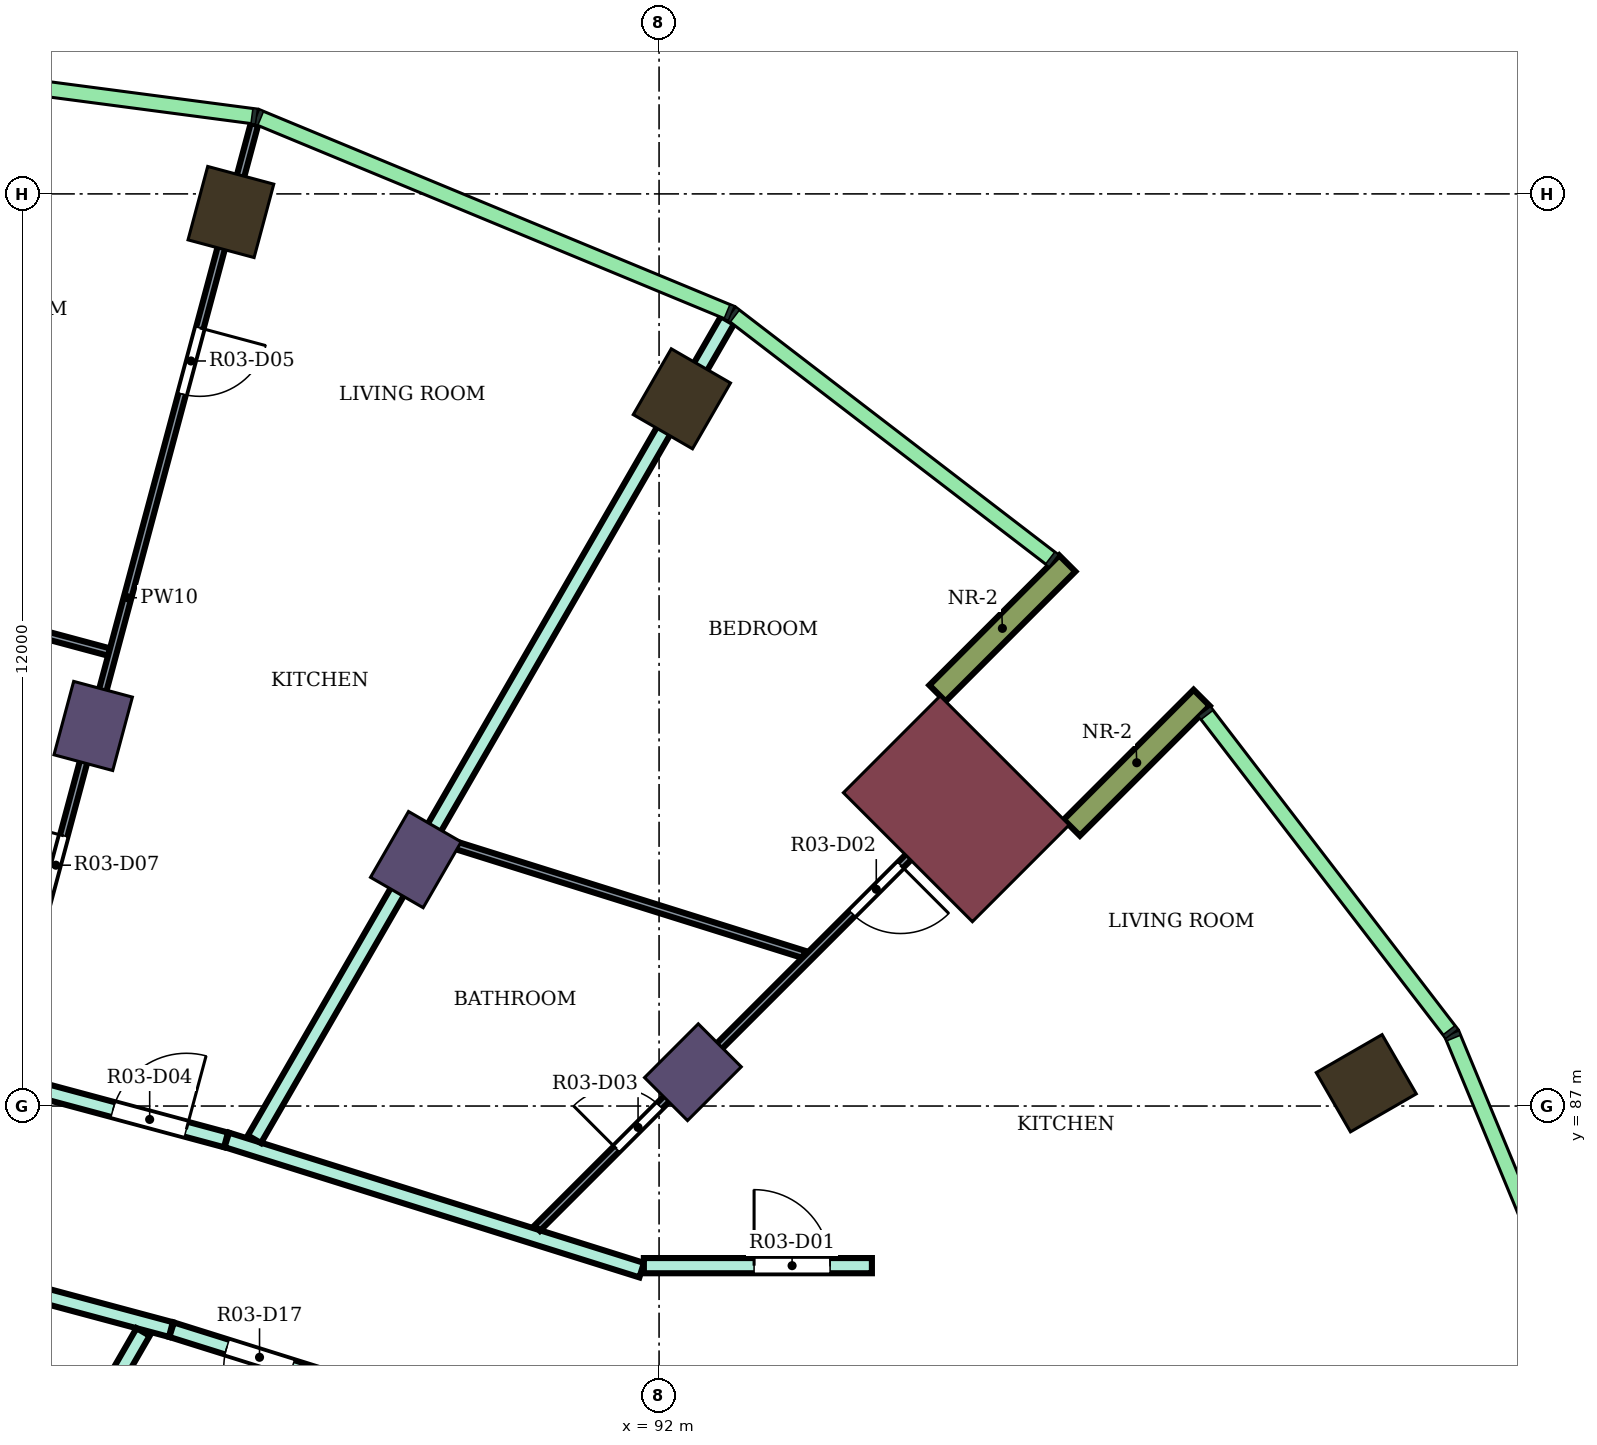
"""IFC4 building model, lengths in metres.
Left out: names, types, materials, properties, quantities, classifications, styles, units other than length and angle.
Written with IfcOpenShell. Run it as: python <this file> out.ifc"""

import sys

from ifc_helpers import new_model, si_unit, direction, frame, frame_2d, origin, origin_2d, place, context, subcontext, project, spatial, rectangle, extrude, element, fill, save


model = new_model("IFC4")
c1 = context("Model", 3, precision=1e-05, world=origin(), true_north=direction((0.0, 1.0)))
c2 = subcontext(c1, "Body", "Model", "MODEL_VIEW")
j1 = project(units=[si_unit("LENGTHUNIT", "METRE"), si_unit("PLANEANGLEUNIT", "RADIAN")], contexts=[c1])
p1 = place(None, origin())
s1 = spatial("IfcSite", under=j1, at=p1, CompositionType="ELEMENT")
p2 = place(p1, origin())
s2 = spatial("IfcBuilding", under=s1, at=p2, CompositionType="ELEMENT")
p3 = place(p2, frame((0.0, 0.0, 186.4)))
s3 = spatial("IfcBuildingStorey", under=s2, at=p3, CompositionType="ELEMENT", Elevation=186.4)
for number, where, z_axis, x_axis in (
    (1, (101.304, 87.3, 0.0), (0.0, 0.0, 1.0), (0.866, 0.5, 0.0)),
    (2, (92.3, 96.304, 0.0), (0.0, 0.0, 1.0), (0.5, 0.866, 0.0)),
    (3, (86.367, 98.762, 0.0), (0.0, 0.0, 1.0), (0.259, 0.966, 0.0)),
):
    element("IfcColumn", number, at=place(p3, frame(where, z_axis=z_axis, x_axis=x_axis)), inside=s3, PredefinedType="COLUMN", context=c2, shape_type="SweptSolid", body=[
        extrude(rectangle(XDim=1.0, YDim=0.9, at=origin_2d()), origin(), (0.0, 0.0, 1.0), 4.1),
    ])
for number, where, z_axis, x_axis in (
    (4, (92.445, 87.445, 0.0), (0.0, 0.0, 1.0), (0.707, 0.707, 0.0)),
    (5, (88.8, 90.242, 0.0), (0.0, 0.0, 1.0), (0.5, 0.866, 0.0)),
    (6, (84.555, 92.0, 0.0), (0.0, 0.0, 1.0), (0.259, 0.966, 0.0)),
):
    element("IfcColumn", number, at=place(p3, frame(where, z_axis=z_axis, x_axis=x_axis)), inside=s3, PredefinedType="COLUMN", context=c2, shape_type="SweptSolid", body=[
        extrude(rectangle(XDim=1.0, YDim=0.8, at=origin_2d()), origin(), (0.0, 0.0, 1.0), 4.1),
    ])
p4 = place(p3, frame((95.91, 90.91, 0.0), z_axis=(0.0, 0.0, 1.0), x_axis=(0.707106781187, 0.707106781187, 0.0)))
e7 = element("IfcColumn", 7, at=p4, inside=s3, PredefinedType="COLUMN", context=c2, shape_type="SweptSolid", body=[
    extrude(rectangle(XDim=1.8, YDim=2.4, at=origin_2d()), origin(), (0.0, 0.0, 1.0), 4.1),
])
for number, where, z_axis, x_axis in (
    (8, (97.43, 90.662, 0.0), (0.0, 0.0, 1.0), (0.707, 0.707, 0.0)),
    (9, (95.662, 92.43, 0.0), (0.0, 0.0, 1.0), (0.707, 0.707, 0.0)),
):
    element("IfcWall", number, at=place(p3, frame(where, z_axis=z_axis, x_axis=x_axis)), inside=s3, PredefinedType="NOTDEFINED", context=c2, shape_type="SweptSolid", body=[
        extrude(rectangle(XDim=2.416, YDim=0.3, at=frame_2d((1.208, 0.0))), origin(), (0.0, 0.0, 1.0), 4.1),
    ])
p5 = place(p3, frame((80.0, 85.554, 0.0), z_axis=(0.0, 0.0, 1.0), x_axis=(0.965928989968, -0.258807237802, 0.0)))
e10 = element("IfcWall", 10, at=p5, inside=s3, PredefinedType="PARTITIONING", context=c2, shape_type="SweptSolid", body=[
    extrude(rectangle(XDim=5.774, YDim=0.2, at=frame_2d((2.887, 0.0))), origin(), (0.0, 0.0, 1.0), 3.65),
])
p6 = place(p5, frame((2.292, 0.0, 0.0)))
e11 = element("IfcOpeningElement", 11, at=p6, cuts=e10, PredefinedType="OPENING", context=c2, shape_type="SweptSolid", body=[
    extrude(rectangle(XDim=0.9, YDim=2.1, at=frame_2d((0.45, 1.05))), frame((0.0, 0.11, 0.0), z_axis=(0.0, -1.0, 0.0), x_axis=(1.0, 0.0, 0.0)), (0.0, 0.0, 1.0), 0.22),
])
p7 = place(p3, frame((80.048, 88.233, 0.0), z_axis=(0.0, 0.0, 1.0), x_axis=(0.965787353661, -0.259335280109, 0.0)))
e12 = element("IfcWall", 12, at=p7, inside=s3, PredefinedType="PARTITIONING", context=c2, shape_type="SweptSolid", body=[
    extrude(rectangle(XDim=6.476, YDim=0.2, at=frame_2d((3.238, 0.0))), origin(), (0.0, 0.0, 1.0), 3.65),
])
p8 = place(p7, frame((4.936, 0.0, 0.0)))
e13 = element("IfcOpeningElement", 13, at=p8, cuts=e12, PredefinedType="OPENING", context=c2, shape_type="SweptSolid", body=[
    extrude(rectangle(XDim=1.0, YDim=2.1, at=frame_2d((0.5, 1.05))), frame((0.0, 0.11, 0.0), z_axis=(0.0, -1.0, 0.0), x_axis=(1.0, 0.0, 0.0)), (0.0, 0.0, 1.0), 0.22),
])
p9 = place(p3, frame((83.849, 81.667, 0.0), z_axis=(0.0, 0.0, 1.0), x_axis=(0.500117899823, 0.865957323588, 0.0)))
e14 = element("IfcWall", 14, at=p9, inside=s3, PredefinedType="PARTITIONING", context=c2, shape_type="SweptSolid", body=[
    extrude(rectangle(XDim=2.725, YDim=0.2, at=frame_2d((1.363, 0.0))), origin(), (0.0, 0.0, 1.0), 3.65),
])
p10 = place(p3, frame((85.587, 84.057, 0.0), z_axis=(0.0, 0.0, 1.0), x_axis=(0.954239513179, -0.299043393987, 0.0)))
e15 = element("IfcWall", 15, at=p10, inside=s3, PredefinedType="PARTITIONING", context=c2, shape_type="SweptSolid", body=[
    extrude(rectangle(XDim=2.424, YDim=0.2, at=frame_2d((1.212, 0.0))), origin(), (0.0, 0.0, 1.0), 3.65),
])
p11 = place(p10, frame((0.762, 0.0, 0.0)))
e16 = element("IfcOpeningElement", 16, at=p11, cuts=e15, PredefinedType="OPENING", context=c2, shape_type="SweptSolid", body=[
    extrude(rectangle(XDim=0.9, YDim=2.1, at=frame_2d((0.45, 1.05))), frame((0.0, 0.11, 0.0), z_axis=(0.0, -1.0, 0.0), x_axis=(1.0, 0.0, 0.0)), (0.0, 0.0, 1.0), 0.22),
])
p12 = place(p3, frame((86.313, 86.554, 0.0), z_axis=(0.0, 0.0, 1.0), x_axis=(0.954081217458, -0.299548043717, 0.0)))
e17 = element("IfcWall", 17, at=p12, inside=s3, PredefinedType="PARTITIONING", context=c2, shape_type="SweptSolid", body=[
    extrude(rectangle(XDim=5.721, YDim=0.2, at=frame_2d((2.86, 0.0))), origin(), (0.0, 0.0, 1.0), 3.65),
])
p13 = place(p3, frame((86.676, 86.563, 0.0), z_axis=(0.0, 0.0, 1.0), x_axis=(0.500130524836, 0.865950032119, 0.0)))
e18 = element("IfcWall", 18, at=p13, inside=s3, PredefinedType="PARTITIONING", context=c2, shape_type="SweptSolid", body=[
    extrude(rectangle(XDim=12.446, YDim=0.2, at=frame_2d((6.223, 0.0))), origin(), (0.0, 0.0, 1.0), 3.65),
])
p14 = place(p3, frame((91.8, 84.9, 0.0), z_axis=(0.0, 0.0, 1.0), x_axis=(1.0, 0.0, 0.0)))
e19 = element("IfcWall", 19, at=p14, inside=s3, PredefinedType="PARTITIONING", context=c2, shape_type="SweptSolid", body=[
    extrude(rectangle(XDim=3.0, YDim=0.2, at=frame_2d((1.5, 0.0))), origin(), (0.0, 0.0, 1.0), 3.65),
])
p15 = place(p14, frame((1.45, 0.0, 0.0)))
e20 = element("IfcOpeningElement", 20, at=p15, cuts=e19, PredefinedType="OPENING", context=c2, shape_type="SweptSolid", body=[
    extrude(rectangle(XDim=1.0, YDim=2.1, at=frame_2d((0.5, 1.05))), frame((0.0, 0.11, 0.0), z_axis=(0.0, -1.0, 0.0), x_axis=(1.0, 0.0, 0.0)), (0.0, 0.0, 1.0), 0.22),
])
p16 = place(p3, frame((80.058, 94.235, 0.0), z_axis=(0.0, 0.0, 1.0), x_axis=(0.965831212389, -0.259171891173, 0.0)))
e21 = element("IfcWall", 21, at=p16, inside=s3, PredefinedType="PARTITIONING", context=c2, shape_type="SweptSolid", body=[
    extrude(rectangle(XDim=4.872, YDim=0.1, at=frame_2d((2.436, 0.0))), origin(), (0.0, 0.0, 1.0), 3.65),
])
p17 = place(p16, frame((0.792, 0.0, 0.0)))
e22 = element("IfcOpeningElement", 22, at=p17, cuts=e21, PredefinedType="OPENING", context=c2, shape_type="SweptSolid", body=[
    extrude(rectangle(XDim=0.8, YDim=2.1, at=frame_2d((0.4, 1.05))), frame((0.0, 0.06, 0.0), z_axis=(0.0, -1.0, 0.0), x_axis=(1.0, 0.0, 0.0)), (0.0, 0.0, 1.0), 0.12),
])
p18 = place(p3, frame((83.337, 87.455, 0.0), z_axis=(0.0, 0.0, 1.0), x_axis=(0.258861232071, 0.965914521337, 0.0)))
e23 = element("IfcWall", 23, at=p18, inside=s3, PredefinedType="PARTITIONING", context=c2, shape_type="SweptSolid", body=[
    extrude(rectangle(XDim=12.904, YDim=0.1, at=frame_2d((6.452, 0.0))), origin(), (0.0, 0.0, 1.0), 3.65),
])
p19 = place(p18, frame((9.227, 0.0, 0.0)))
e24 = element("IfcOpeningElement", 24, at=p19, cuts=e23, PredefinedType="OPENING", context=c2, shape_type="SweptSolid", body=[
    extrude(rectangle(XDim=0.9, YDim=2.1, at=frame_2d((0.45, 1.05))), frame((0.0, 0.06, 0.0), z_axis=(0.0, -1.0, 0.0), x_axis=(1.0, 0.0, 0.0)), (0.0, 0.0, 1.0), 0.12),
])
p20 = place(p18, frame((2.409, 0.0, 0.0)))
e25 = element("IfcOpeningElement", 25, at=p20, cuts=e23, PredefinedType="OPENING", context=c2, shape_type="SweptSolid", body=[
    extrude(rectangle(XDim=0.8, YDim=2.1, at=frame_2d((0.4, 1.05))), frame((0.0, 0.06, 0.0), z_axis=(0.0, -1.0, 0.0), x_axis=(1.0, 0.0, 0.0)), (0.0, 0.0, 1.0), 0.12),
])
p21 = place(p3, frame((89.078, 90.508, 0.0), z_axis=(0.0, 0.0, 1.0), x_axis=(0.954199699612, -0.299170408398, 0.0)))
e26 = element("IfcWall", 26, at=p21, inside=s3, PredefinedType="PARTITIONING", context=c2, shape_type="SweptSolid", body=[
    extrude(rectangle(XDim=5.06, YDim=0.1, at=frame_2d((2.53, 0.0))), origin(), (0.0, 0.0, 1.0), 3.65),
])
p22 = place(p3, frame((90.397, 85.393, 0.0), z_axis=(0.0, 0.0, 1.0), x_axis=(0.707264750546, 0.706948776529, 0.0)))
e27 = element("IfcWall", 27, at=p22, inside=s3, PredefinedType="PARTITIONING", context=c2, shape_type="SweptSolid", body=[
    extrude(rectangle(XDim=8.499, YDim=0.1, at=frame_2d((4.25, 0.0))), origin(), (0.0, 0.0, 1.0), 3.65),
])
p23 = place(p22, frame((5.857, 0.0, 0.0)))
e28 = element("IfcOpeningElement", 28, at=p23, cuts=e27, PredefinedType="OPENING", context=c2, shape_type="SweptSolid", body=[
    extrude(rectangle(XDim=0.9, YDim=2.1, at=frame_2d((0.45, 1.05))), frame((0.0, 0.06, 0.0), z_axis=(0.0, -1.0, 0.0), x_axis=(1.0, 0.0, 0.0)), (0.0, 0.0, 1.0), 0.12),
])
p24 = place(p22, frame((1.476, 0.0, 0.0)))
e29 = element("IfcOpeningElement", 29, at=p24, cuts=e27, PredefinedType="OPENING", context=c2, shape_type="SweptSolid", body=[
    extrude(rectangle(XDim=0.8, YDim=2.1, at=frame_2d((0.4, 1.05))), frame((0.0, 0.06, 0.0), z_axis=(0.0, -1.0, 0.0), x_axis=(1.0, 0.0, 0.0)), (0.0, 0.0, 1.0), 0.12),
])
p25 = place(p15, origin())
e30 = element("IfcDoor", 30, at=p25, inside=s3, OperationType="SINGLE_SWING_LEFT", PredefinedType="DOOR", context=c2, shape_type="SweptSolid", body=[
    extrude(rectangle(XDim=1.0, YDim=2.1, at=frame_2d((0.5, 1.05))), frame((0.0, 0.025, 0.0), z_axis=(0.0, -1.0, 0.0), x_axis=(1.0, 0.0, 0.0)), (0.0, 0.0, 1.0), 0.05),
])
fill(e20, e30)
p26 = place(p23, frame((0.9, 0.0, 0.0), z_axis=(0.0, 0.0, 1.0), x_axis=(-1.0, 0.0, 0.0)))
e31 = element("IfcDoor", 31, at=p26, inside=s3, OperationType="SINGLE_SWING_LEFT", PredefinedType="DOOR", context=c2, shape_type="SweptSolid", body=[
    extrude(rectangle(XDim=0.9, YDim=2.1, at=frame_2d((0.45, 1.05))), frame((0.0, 0.025, 0.0), z_axis=(0.0, -1.0, 0.0), x_axis=(1.0, 0.0, 0.0)), (0.0, 0.0, 1.0), 0.05),
])
fill(e28, e31)
p27 = place(p24, origin())
e32 = element("IfcDoor", 32, at=p27, inside=s3, OperationType="SINGLE_SWING_LEFT", PredefinedType="DOOR", context=c2, shape_type="SweptSolid", body=[
    extrude(rectangle(XDim=0.8, YDim=2.1, at=frame_2d((0.4, 1.05))), frame((0.0, 0.025, 0.0), z_axis=(0.0, -1.0, 0.0), x_axis=(1.0, 0.0, 0.0)), (0.0, 0.0, 1.0), 0.05),
])
fill(e29, e32)
p28 = place(p8, origin())
e33 = element("IfcDoor", 33, at=p28, inside=s3, OperationType="SINGLE_SWING_RIGHT", PredefinedType="DOOR", context=c2, shape_type="SweptSolid", body=[
    extrude(rectangle(XDim=1.0, YDim=2.1, at=frame_2d((0.5, 1.05))), frame((0.0, 0.025, 0.0), z_axis=(0.0, -1.0, 0.0), x_axis=(1.0, 0.0, 0.0)), (0.0, 0.0, 1.0), 0.05),
])
fill(e13, e33)
p29 = place(p19, frame((0.9, 0.0, 0.0), z_axis=(0.0, 0.0, 1.0), x_axis=(-1.0, 0.0, 0.0)))
e34 = element("IfcDoor", 34, at=p29, inside=s3, OperationType="SINGLE_SWING_LEFT", PredefinedType="DOOR", context=c2, shape_type="SweptSolid", body=[
    extrude(rectangle(XDim=0.9, YDim=2.1, at=frame_2d((0.45, 1.05))), frame((0.0, 0.025, 0.0), z_axis=(0.0, -1.0, 0.0), x_axis=(1.0, 0.0, 0.0)), (0.0, 0.0, 1.0), 0.05),
])
fill(e24, e34)
p30 = place(p20, origin())
e35 = element("IfcDoor", 35, at=p30, inside=s3, OperationType="SINGLE_SWING_RIGHT", PredefinedType="DOOR", context=c2, shape_type="SweptSolid", body=[
    extrude(rectangle(XDim=0.8, YDim=2.1, at=frame_2d((0.4, 1.05))), frame((0.0, 0.025, 0.0), z_axis=(0.0, -1.0, 0.0), x_axis=(1.0, 0.0, 0.0)), (0.0, 0.0, 1.0), 0.05),
])
fill(e25, e35)
p31 = place(p11, frame((0.9, 0.0, 0.0), z_axis=(0.0, 0.0, 1.0), x_axis=(-1.0, 0.0, 0.0)))
e36 = element("IfcDoor", 36, at=p31, inside=s3, OperationType="SINGLE_SWING_LEFT", PredefinedType="DOOR", context=c2, shape_type="SweptSolid", body=[
    extrude(rectangle(XDim=0.9, YDim=2.1, at=frame_2d((0.45, 1.05))), frame((0.0, 0.025, 0.0), z_axis=(0.0, -1.0, 0.0), x_axis=(1.0, 0.0, 0.0)), (0.0, 0.0, 1.0), 0.05),
])
fill(e16, e36)
save(model, sys.argv[1])
